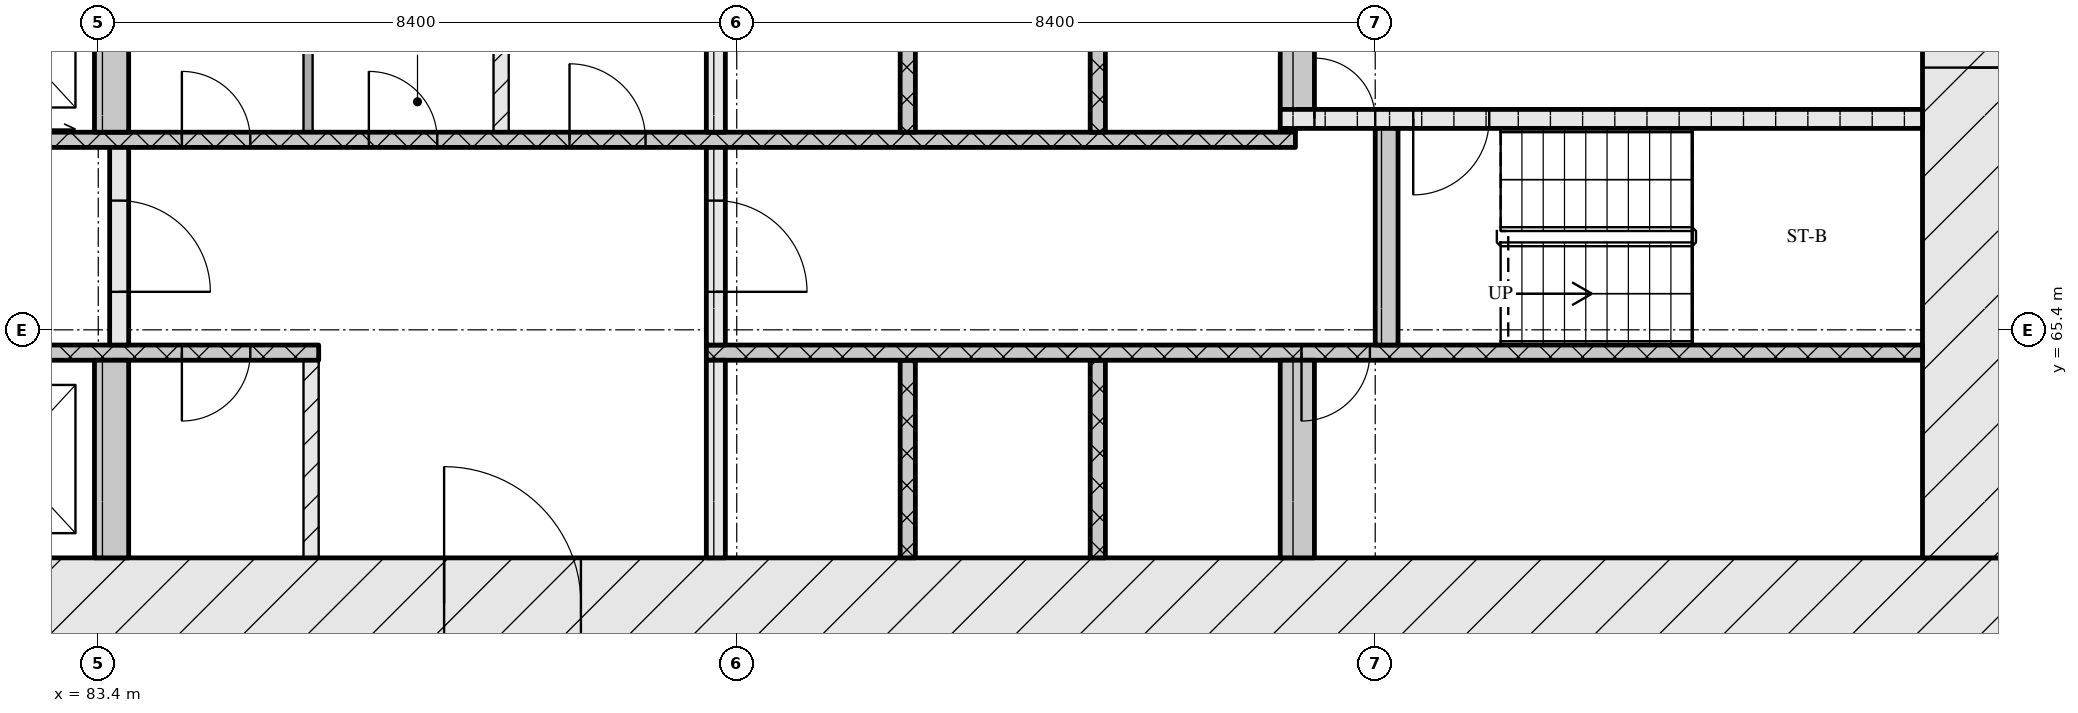
"""IFC4 building model, lengths in metres.
Left out: names, types, materials, properties, quantities, classifications, styles, units other than length and angle.
Written with IfcOpenShell. Run it as: python <this file> out.ifc"""

import sys

from ifc_helpers import new_model, si_unit, direction, frame, frame_2d, origin, place, context, subcontext, project, spatial, rectangle, extrude, element, fill, save


model = new_model("IFC4")
c1 = context("Model", 3, precision=1e-05, world=origin(), true_north=direction((0.0, 1.0)))
c2 = subcontext(c1, "Body", "Model", "MODEL_VIEW")
j1 = project(units=[si_unit("LENGTHUNIT", "METRE"), si_unit("PLANEANGLEUNIT", "RADIAN")], contexts=[c1])
p1 = place(None, origin())
s1 = spatial("IfcSite", under=j1, at=p1, CompositionType="ELEMENT")
p2 = place(p1, origin())
s2 = spatial("IfcBuilding", under=s1, at=p2, CompositionType="ELEMENT")
p3 = place(p2, frame((0.0, 0.0, 37.2)))
s3 = spatial("IfcBuildingStorey", under=s2, at=p3, CompositionType="ELEMENT", Elevation=37.2)
p4 = place(p3, frame((66.6, 61.8, 0.0), z_axis=(0.0, 0.0, 1.0), x_axis=(1.0, 0.0, 0.0)))
e1 = element("IfcWall", 1, at=p4, inside=s3, PredefinedType="SOLIDWALL", context=c2, shape_type="SweptSolid", body=[
    extrude(rectangle(XDim=42.0, YDim=1.2, at=frame_2d((21.0, 0.0))), origin(), (0.0, 0.0, 1.0), 3.32),
])
p5 = place(p4, frame((21.35, 0.0, 0.0)))
e2 = element("IfcOpeningElement", 2, at=p5, cuts=e1, PredefinedType="OPENING", context=c2, shape_type="SweptSolid", body=[
    extrude(rectangle(XDim=1.8, YDim=2.1, at=frame_2d((0.9, 1.05))), frame((0.0, 0.61, 0.0), z_axis=(0.0, -1.0, 0.0), x_axis=(1.0, 0.0, 0.0)), (0.0, 0.0, 1.0), 1.22),
])
p6 = place(p3, frame((108.0, 62.4, 0.0), z_axis=(0.0, 0.0, 1.0), x_axis=(0.0, 1.0, 0.0)))
e3 = element("IfcWall", 3, at=p6, inside=s3, PredefinedType="SOLIDWALL", context=c2, shape_type="SweptSolid", body=[
    extrude(rectangle(XDim=12.0, YDim=1.2, at=frame_2d((6.0, 0.0))), origin(), (0.0, 0.0, 1.0), 3.32),
])
p7 = place(p6, frame((6.45, 0.0, 0.0)))
e4 = element("IfcOpeningElement", 4, at=p7, cuts=e3, PredefinedType="OPENING", context=c2, shape_type="SweptSolid", body=[
    extrude(rectangle(XDim=1.2, YDim=2.1, at=frame_2d((0.6, 1.05))), frame((0.0, 0.61, 0.0), z_axis=(0.0, -1.0, 0.0), x_axis=(1.0, 0.0, 0.0)), (0.0, 0.0, 1.0), 1.22),
])
p8 = place(p3, frame((83.575, 62.4, 0.0), z_axis=(0.0, 0.0, 1.0), x_axis=(0.0, 1.0, 0.0)))
e5 = element("IfcWall", 5, at=p8, inside=s3, PredefinedType="SOLIDWALL", context=c2, shape_type="SweptSolid", body=[
    extrude(rectangle(XDim=2.6, YDim=0.45, at=frame_2d((1.3, 0.0))), origin(), (0.0, 0.0, 1.0), 3.32),
])
p9 = place(p3, frame((86.2, 62.4, 0.0), z_axis=(0.0, 0.0, 1.0), x_axis=(0.0, 1.0, 0.0)))
e6 = element("IfcWall", 6, at=p9, inside=s3, PredefinedType="PARTITIONING", context=c2, shape_type="SweptSolid", body=[
    extrude(rectangle(XDim=2.6, YDim=0.2, at=frame_2d((1.3, 0.0))), origin(), (0.0, 0.0, 1.0), 3.32),
])
p10 = place(p3, frame((91.525, 62.4, 0.0), z_axis=(0.0, 0.0, 1.0), x_axis=(0.0, 1.0, 0.0)))
e7 = element("IfcWall", 7, at=p10, inside=s3, PredefinedType="SOLIDWALL", context=c2, shape_type="SweptSolid", body=[
    extrude(rectangle(XDim=2.6, YDim=0.25, at=frame_2d((1.3, 0.0))), origin(), (0.0, 0.0, 1.0), 3.32),
])
for number, where, z_axis, x_axis in (
    (8, (94.05, 62.4, 0.0), (0.0, 0.0, 1.0), (0.0, 1.0, 0.0)),
    (9, (96.55, 62.4, 0.0), (0.0, 0.0, 1.0), (0.0, 1.0, 0.0)),
):
    element("IfcWall", number, at=place(p3, frame(where, z_axis=z_axis, x_axis=x_axis)), inside=s3, PredefinedType="SOLIDWALL", context=c2, shape_type="SweptSolid", body=[
        extrude(rectangle(XDim=2.6, YDim=0.2, at=frame_2d((1.3, 0.0))), origin(), (0.0, 0.0, 1.0), 3.32),
    ])
p11 = place(p3, frame((99.175, 62.4, 0.0), z_axis=(0.0, 0.0, 1.0), x_axis=(0.0, 1.0, 0.0)))
e10 = element("IfcWall", 10, at=p11, inside=s3, PredefinedType="SOLIDWALL", context=c2, shape_type="SweptSolid", body=[
    extrude(rectangle(XDim=2.6, YDim=0.45, at=frame_2d((1.3, 0.0))), origin(), (0.0, 0.0, 1.0), 3.32),
])
p12 = place(p3, frame((67.8, 65.1, 0.0), z_axis=(0.0, 0.0, 1.0), x_axis=(1.0, 0.0, 0.0)))
e11 = element("IfcWall", 11, at=p12, inside=s3, PredefinedType="SOLIDWALL", context=c2, shape_type="SweptSolid", body=[
    extrude(rectangle(XDim=18.5, YDim=0.2, at=frame_2d((9.25, 0.0))), origin(), (0.0, 0.0, 1.0), 3.32),
])
p13 = place(p12, frame((7.27, 0.0, 0.0)))
e12 = element("IfcOpeningElement", 12, at=p13, cuts=e11, PredefinedType="OPENING", context=c2, shape_type="SweptSolid", body=[
    extrude(rectangle(XDim=0.9, YDim=2.1, at=frame_2d((0.45, 1.05))), frame((0.0, 0.11, 0.0), z_axis=(0.0, -1.0, 0.0), x_axis=(1.0, 0.0, 0.0)), (0.0, 0.0, 1.0), 0.22),
])
p14 = place(p12, frame((8.85, 0.0, 0.0)))
e13 = element("IfcOpeningElement", 13, at=p14, cuts=e11, PredefinedType="OPENING", context=c2, shape_type="SweptSolid", body=[
    extrude(rectangle(XDim=1.1, YDim=2.1, at=frame_2d((0.55, 1.05))), frame((0.0, 0.11, 0.0), z_axis=(0.0, -1.0, 0.0), x_axis=(1.0, 0.0, 0.0)), (0.0, 0.0, 1.0), 0.22),
])
p15 = place(p12, frame((11.35, 0.0, 0.0)))
e14 = element("IfcOpeningElement", 14, at=p15, cuts=e11, PredefinedType="OPENING", context=c2, shape_type="SweptSolid", body=[
    extrude(rectangle(XDim=1.1, YDim=2.1, at=frame_2d((0.55, 1.05))), frame((0.0, 0.11, 0.0), z_axis=(0.0, -1.0, 0.0), x_axis=(1.0, 0.0, 0.0)), (0.0, 0.0, 1.0), 0.22),
])
p16 = place(p12, frame((13.85, 0.0, 0.0)))
e15 = element("IfcOpeningElement", 15, at=p16, cuts=e11, PredefinedType="OPENING", context=c2, shape_type="SweptSolid", body=[
    extrude(rectangle(XDim=1.1, YDim=2.1, at=frame_2d((0.55, 1.05))), frame((0.0, 0.11, 0.0), z_axis=(0.0, -1.0, 0.0), x_axis=(1.0, 0.0, 0.0)), (0.0, 0.0, 1.0), 0.22),
])
p17 = place(p12, frame((16.7, 0.0, 0.0)))
e16 = element("IfcOpeningElement", 16, at=p17, cuts=e11, PredefinedType="OPENING", context=c2, shape_type="SweptSolid", body=[
    extrude(rectangle(XDim=0.9, YDim=2.1, at=frame_2d((0.45, 1.05))), frame((0.0, 0.11, 0.0), z_axis=(0.0, -1.0, 0.0), x_axis=(1.0, 0.0, 0.0)), (0.0, 0.0, 1.0), 0.22),
])
p18 = place(p3, frame((91.4, 65.1, 0.0), z_axis=(0.0, 0.0, 1.0), x_axis=(1.0, 0.0, 0.0)))
e17 = element("IfcWall", 17, at=p18, inside=s3, PredefinedType="SOLIDWALL", context=c2, shape_type="SweptSolid", body=[
    extrude(rectangle(XDim=16.0, YDim=0.2, at=frame_2d((8.0, 0.0))), origin(), (0.0, 0.0, 1.0), 3.32),
])
p19 = place(p18, frame((7.83, 0.0, 0.0)))
e18 = element("IfcOpeningElement", 18, at=p19, cuts=e17, PredefinedType="OPENING", context=c2, shape_type="SweptSolid", body=[
    extrude(rectangle(XDim=0.9, YDim=2.1, at=frame_2d((0.45, 1.05))), frame((0.0, 0.11, 0.0), z_axis=(0.0, -1.0, 0.0), x_axis=(1.0, 0.0, 0.0)), (0.0, 0.0, 1.0), 0.22),
])
p20 = place(p3, frame((83.675, 65.2, 0.0), z_axis=(0.0, 0.0, 1.0), x_axis=(0.0, 1.0, 0.0)))
e19 = element("IfcWall", 19, at=p20, inside=s3, PredefinedType="SOLIDWALL", context=c2, shape_type="SweptSolid", body=[
    extrude(rectangle(XDim=2.6, YDim=0.25, at=frame_2d((1.3, 0.0))), origin(), (0.0, 0.0, 1.0), 3.32),
])
p21 = place(p20, frame((0.7, 0.0, 0.0)))
e20 = element("IfcOpeningElement", 20, at=p21, cuts=e19, PredefinedType="OPENING", context=c2, shape_type="SweptSolid", body=[
    extrude(rectangle(XDim=1.2, YDim=2.1, at=frame_2d((0.6, 1.05))), frame((0.0, 0.135, 0.0), z_axis=(0.0, -1.0, 0.0), x_axis=(1.0, 0.0, 0.0)), (0.0, 0.0, 1.0), 0.27),
])
p22 = place(p3, frame((91.525, 65.2, 0.0), z_axis=(0.0, 0.0, 1.0), x_axis=(0.0, 1.0, 0.0)))
e21 = element("IfcWall", 21, at=p22, inside=s3, PredefinedType="SOLIDWALL", context=c2, shape_type="SweptSolid", body=[
    extrude(rectangle(XDim=2.6, YDim=0.25, at=frame_2d((1.3, 0.0))), origin(), (0.0, 0.0, 1.0), 3.32),
])
p23 = place(p22, frame((0.7, 0.0, 0.0)))
e22 = element("IfcOpeningElement", 22, at=p23, cuts=e21, PredefinedType="OPENING", context=c2, shape_type="SweptSolid", body=[
    extrude(rectangle(XDim=1.2, YDim=2.1, at=frame_2d((0.6, 1.05))), frame((0.0, 0.135, 0.0), z_axis=(0.0, -1.0, 0.0), x_axis=(1.0, 0.0, 0.0)), (0.0, 0.0, 1.0), 0.27),
])
p24 = place(p3, frame((100.35, 65.2, 0.0), z_axis=(0.0, 0.0, 1.0), x_axis=(0.0, 1.0, 0.0)))
e23 = element("IfcWall", 23, at=p24, inside=s3, PredefinedType="SOLIDWALL", context=c2, shape_type="SweptSolid", body=[
    extrude(rectangle(XDim=2.85, YDim=0.3, at=frame_2d((1.425, 0.0))), origin(), (0.0, 0.0, 1.0), 3.32),
])
p25 = place(p3, frame((76.05, 67.9, 0.0), z_axis=(0.0, 0.0, 1.0), x_axis=(1.0, 0.0, 0.0)))
e24 = element("IfcWall", 24, at=p25, inside=s3, PredefinedType="SOLIDWALL", context=c2, shape_type="SweptSolid", body=[
    extrude(rectangle(XDim=23.1, YDim=0.2, at=frame_2d((11.55, 0.0))), origin(), (0.0, 0.0, 1.0), 3.32),
])
p26 = place(p25, frame((0.6, 0.0, 0.0)))
e25 = element("IfcOpeningElement", 25, at=p26, cuts=e24, PredefinedType="OPENING", context=c2, shape_type="SweptSolid", body=[
    extrude(rectangle(XDim=1.1, YDim=2.1, at=frame_2d((0.55, 1.05))), frame((0.0, 0.11, 0.0), z_axis=(0.0, -1.0, 0.0), x_axis=(1.0, 0.0, 0.0)), (0.0, 0.0, 1.0), 0.22),
])
p27 = place(p25, frame((3.1, 0.0, 0.0)))
e26 = element("IfcOpeningElement", 26, at=p27, cuts=e24, PredefinedType="OPENING", context=c2, shape_type="SweptSolid", body=[
    extrude(rectangle(XDim=1.1, YDim=2.1, at=frame_2d((0.55, 1.05))), frame((0.0, 0.11, 0.0), z_axis=(0.0, -1.0, 0.0), x_axis=(1.0, 0.0, 0.0)), (0.0, 0.0, 1.0), 0.22),
])
p28 = place(p25, frame((5.6, 0.0, 0.0)))
e27 = element("IfcOpeningElement", 27, at=p28, cuts=e24, PredefinedType="OPENING", context=c2, shape_type="SweptSolid", body=[
    extrude(rectangle(XDim=1.1, YDim=2.1, at=frame_2d((0.55, 1.05))), frame((0.0, 0.11, 0.0), z_axis=(0.0, -1.0, 0.0), x_axis=(1.0, 0.0, 0.0)), (0.0, 0.0, 1.0), 0.22),
])
p29 = place(p25, frame((8.45, 0.0, 0.0)))
e28 = element("IfcOpeningElement", 28, at=p29, cuts=e24, PredefinedType="OPENING", context=c2, shape_type="SweptSolid", body=[
    extrude(rectangle(XDim=0.9, YDim=2.1, at=frame_2d((0.45, 1.05))), frame((0.0, 0.11, 0.0), z_axis=(0.0, -1.0, 0.0), x_axis=(1.0, 0.0, 0.0)), (0.0, 0.0, 1.0), 0.22),
])
p30 = place(p25, frame((10.91, 0.0, 0.0)))
e29 = element("IfcOpeningElement", 29, at=p30, cuts=e24, PredefinedType="OPENING", context=c2, shape_type="SweptSolid", body=[
    extrude(rectangle(XDim=0.9, YDim=2.1, at=frame_2d((0.45, 1.05))), frame((0.0, 0.11, 0.0), z_axis=(0.0, -1.0, 0.0), x_axis=(1.0, 0.0, 0.0)), (0.0, 0.0, 1.0), 0.22),
])
p31 = place(p25, frame((13.55, 0.0, 0.0)))
e30 = element("IfcOpeningElement", 30, at=p31, cuts=e24, PredefinedType="OPENING", context=c2, shape_type="SweptSolid", body=[
    extrude(rectangle(XDim=1.0, YDim=2.1, at=frame_2d((0.5, 1.05))), frame((0.0, 0.11, 0.0), z_axis=(0.0, -1.0, 0.0), x_axis=(1.0, 0.0, 0.0)), (0.0, 0.0, 1.0), 0.22),
])
p32 = place(p3, frame((83.575, 68.0, 0.0), z_axis=(0.0, 0.0, 1.0), x_axis=(0.0, 1.0, 0.0)))
e31 = element("IfcWall", 31, at=p32, inside=s3, PredefinedType="SOLIDWALL", context=c2, shape_type="SweptSolid", body=[
    extrude(rectangle(XDim=2.6, YDim=0.45, at=frame_2d((1.3, 0.0))), origin(), (0.0, 0.0, 1.0), 3.32),
])
p33 = place(p3, frame((86.16, 68.0, 0.0), z_axis=(0.0, 0.0, 1.0), x_axis=(0.0, 1.0, 0.0)))
e32 = element("IfcWall", 32, at=p33, inside=s3, PredefinedType="PARTITIONING", context=c2, shape_type="SweptSolid", body=[
    extrude(rectangle(XDim=2.6, YDim=0.12, at=frame_2d((1.3, 0.0))), origin(), (0.0, 0.0, 1.0), 3.32),
])
p34 = place(p3, frame((88.7, 68.0, 0.0), z_axis=(0.0, 0.0, 1.0), x_axis=(0.0, 1.0, 0.0)))
e33 = element("IfcWall", 33, at=p34, inside=s3, PredefinedType="PARTITIONING", context=c2, shape_type="SweptSolid", body=[
    extrude(rectangle(XDim=2.6, YDim=0.2, at=frame_2d((1.3, 0.0))), origin(), (0.0, 0.0, 1.0), 3.32),
])
p35 = place(p3, frame((91.525, 68.0, 0.0), z_axis=(0.0, 0.0, 1.0), x_axis=(0.0, 1.0, 0.0)))
e34 = element("IfcWall", 34, at=p35, inside=s3, PredefinedType="SOLIDWALL", context=c2, shape_type="SweptSolid", body=[
    extrude(rectangle(XDim=2.6, YDim=0.25, at=frame_2d((1.3, 0.0))), origin(), (0.0, 0.0, 1.0), 3.32),
])
for number, where, z_axis, x_axis in (
    (35, (94.05, 68.0, 0.0), (0.0, 0.0, 1.0), (0.0, 1.0, 0.0)),
    (36, (96.55, 68.0, 0.0), (0.0, 0.0, 1.0), (0.0, 1.0, 0.0)),
):
    element("IfcWall", number, at=place(p3, frame(where, z_axis=z_axis, x_axis=x_axis)), inside=s3, PredefinedType="SOLIDWALL", context=c2, shape_type="SweptSolid", body=[
        extrude(rectangle(XDim=2.6, YDim=0.2, at=frame_2d((1.3, 0.0))), origin(), (0.0, 0.0, 1.0), 3.32),
    ])
p36 = place(p3, frame((98.95, 68.025, 0.0), z_axis=(0.0, 0.0, 1.0), x_axis=(1.0, 0.0, 0.0)))
e37 = element("IfcWall", 37, at=p36, inside=s3, PredefinedType="SOLIDWALL", context=c2, shape_type="SweptSolid", body=[
    extrude(rectangle(XDim=0.2, YDim=0.05, at=frame_2d((0.1, 0.0))), origin(), (0.0, 0.0, 1.0), 3.32),
])
p37 = place(p3, frame((98.95, 68.175, 0.0), z_axis=(0.0, 0.0, 1.0), x_axis=(1.0, 0.0, 0.0)))
e38 = element("IfcWall", 38, at=p37, inside=s3, PredefinedType="SOLIDWALL", context=c2, shape_type="SweptSolid", body=[
    extrude(rectangle(XDim=8.45, YDim=0.25, at=frame_2d((4.225, 0.0))), origin(), (0.0, 0.0, 1.0), 3.32),
])
p38 = place(p37, frame((0.45, 0.0, 0.0)))
e39 = element("IfcOpeningElement", 39, at=p38, cuts=e38, PredefinedType="OPENING", context=c2, shape_type="SweptSolid", body=[
    extrude(rectangle(XDim=0.8, YDim=2.1, at=frame_2d((0.4, 1.05))), frame((0.0, 0.135, 0.0), z_axis=(0.0, -1.0, 0.0), x_axis=(1.0, 0.0, 0.0)), (0.0, 0.0, 1.0), 0.27),
])
p39 = place(p37, frame((1.75, 0.0, 0.0)))
e40 = element("IfcOpeningElement", 40, at=p39, cuts=e38, PredefinedType="OPENING", context=c2, shape_type="SweptSolid", body=[
    extrude(rectangle(XDim=1.0, YDim=2.1, at=frame_2d((0.5, 1.05))), frame((0.0, 0.135, 0.0), z_axis=(0.0, -1.0, 0.0), x_axis=(1.0, 0.0, 0.0)), (0.0, 0.0, 1.0), 0.27),
])
p40 = place(p3, frame((99.175, 68.3, 0.0), z_axis=(0.0, 0.0, 1.0), x_axis=(0.0, 1.0, 0.0)))
e41 = element("IfcWall", 41, at=p40, inside=s3, PredefinedType="SOLIDWALL", context=c2, shape_type="SweptSolid", body=[
    extrude(rectangle(XDim=2.3, YDim=0.45, at=frame_2d((1.15, 0.0))), origin(), (0.0, 0.0, 1.0), 3.32),
])
p41 = place(p5, origin())
e42 = element("IfcDoor", 42, at=p41, inside=s3, OperationType="DOUBLE_DOOR_SINGLE_SWING", PredefinedType="DOOR", context=c2, shape_type="SweptSolid", body=[
    extrude(rectangle(XDim=1.8, YDim=2.1, at=frame_2d((0.9, 1.05))), frame((0.0, 0.025, 0.0), z_axis=(0.0, -1.0, 0.0), x_axis=(1.0, 0.0, 0.0)), (0.0, 0.0, 1.0), 0.05),
])
fill(e2, e42)
p42 = place(p17, origin())
e43 = element("IfcDoor", 43, at=p42, inside=s3, OperationType="SINGLE_SWING_RIGHT", PredefinedType="DOOR", context=c2, shape_type="SweptSolid", body=[
    extrude(rectangle(XDim=0.9, YDim=2.1, at=frame_2d((0.45, 1.05))), frame((0.0, 0.025, 0.0), z_axis=(0.0, -1.0, 0.0), x_axis=(1.0, 0.0, 0.0)), (0.0, 0.0, 1.0), 0.05),
])
fill(e16, e43)
p43 = place(p19, origin())
e44 = element("IfcDoor", 44, at=p43, inside=s3, OperationType="SINGLE_SWING_RIGHT", PredefinedType="DOOR", context=c2, shape_type="SweptSolid", body=[
    extrude(rectangle(XDim=0.9, YDim=2.1, at=frame_2d((0.45, 1.05))), frame((0.0, 0.025, 0.0), z_axis=(0.0, -1.0, 0.0), x_axis=(1.0, 0.0, 0.0)), (0.0, 0.0, 1.0), 0.05),
])
fill(e18, e44)
p44 = place(p21, origin())
e45 = element("IfcDoor", 45, at=p44, inside=s3, OperationType="SINGLE_SWING_RIGHT", PredefinedType="DOOR", context=c2, shape_type="SweptSolid", body=[
    extrude(rectangle(XDim=1.2, YDim=2.1, at=frame_2d((0.6, 1.05))), frame((0.0, 0.025, 0.0), z_axis=(0.0, -1.0, 0.0), x_axis=(1.0, 0.0, 0.0)), (0.0, 0.0, 1.0), 0.05),
])
fill(e20, e45)
p45 = place(p23, origin())
e46 = element("IfcDoor", 46, at=p45, inside=s3, OperationType="SINGLE_SWING_RIGHT", PredefinedType="DOOR", context=c2, shape_type="SweptSolid", body=[
    extrude(rectangle(XDim=1.2, YDim=2.1, at=frame_2d((0.6, 1.05))), frame((0.0, 0.025, 0.0), z_axis=(0.0, -1.0, 0.0), x_axis=(1.0, 0.0, 0.0)), (0.0, 0.0, 1.0), 0.05),
])
fill(e22, e46)
p46 = place(p29, origin())
e47 = element("IfcDoor", 47, at=p46, inside=s3, OperationType="SINGLE_SWING_LEFT", PredefinedType="DOOR", context=c2, shape_type="SweptSolid", body=[
    extrude(rectangle(XDim=0.9, YDim=2.1, at=frame_2d((0.45, 1.05))), frame((0.0, 0.025, 0.0), z_axis=(0.0, -1.0, 0.0), x_axis=(1.0, 0.0, 0.0)), (0.0, 0.0, 1.0), 0.05),
])
fill(e28, e47)
p47 = place(p30, origin())
e48 = element("IfcDoor", 48, at=p47, inside=s3, OperationType="SINGLE_SWING_LEFT", PredefinedType="DOOR", context=c2, shape_type="SweptSolid", body=[
    extrude(rectangle(XDim=0.9, YDim=2.1, at=frame_2d((0.45, 1.05))), frame((0.0, 0.025, 0.0), z_axis=(0.0, -1.0, 0.0), x_axis=(1.0, 0.0, 0.0)), (0.0, 0.0, 1.0), 0.05),
])
fill(e29, e48)
p48 = place(p31, origin())
e49 = element("IfcDoor", 49, at=p48, inside=s3, OperationType="SINGLE_SWING_LEFT", PredefinedType="DOOR", context=c2, shape_type="SweptSolid", body=[
    extrude(rectangle(XDim=1.0, YDim=2.1, at=frame_2d((0.5, 1.05))), frame((0.0, 0.025, 0.0), z_axis=(0.0, -1.0, 0.0), x_axis=(1.0, 0.0, 0.0)), (0.0, 0.0, 1.0), 0.05),
])
fill(e30, e49)
p49 = place(p38, origin())
e50 = element("IfcDoor", 50, at=p49, inside=s3, OperationType="SINGLE_SWING_LEFT", PredefinedType="DOOR", context=c2, shape_type="SweptSolid", body=[
    extrude(rectangle(XDim=0.8, YDim=2.1, at=frame_2d((0.4, 1.05))), frame((0.0, 0.025, 0.0), z_axis=(0.0, -1.0, 0.0), x_axis=(1.0, 0.0, 0.0)), (0.0, 0.0, 1.0), 0.05),
])
fill(e39, e50)
p50 = place(p39, origin())
e51 = element("IfcDoor", 51, at=p50, inside=s3, OperationType="SINGLE_SWING_RIGHT", PredefinedType="DOOR", context=c2, shape_type="SweptSolid", body=[
    extrude(rectangle(XDim=1.0, YDim=2.1, at=frame_2d((0.5, 1.05))), frame((0.0, 0.025, 0.0), z_axis=(0.0, -1.0, 0.0), x_axis=(1.0, 0.0, 0.0)), (0.0, 0.0, 1.0), 0.05),
])
fill(e40, e51)
p51 = place(p7, origin())
e52 = element("IfcDoor", 52, at=p51, inside=s3, OperationType="SINGLE_SWING_RIGHT", PredefinedType="DOOR", context=c2, shape_type="SweptSolid", body=[
    extrude(rectangle(XDim=1.2, YDim=2.1, at=frame_2d((0.6, 1.05))), frame((0.0, 0.025, 0.0), z_axis=(0.0, -1.0, 0.0), x_axis=(1.0, 0.0, 0.0)), (0.0, 0.0, 1.0), 0.05),
])
fill(e4, e52)
save(model, sys.argv[1])
